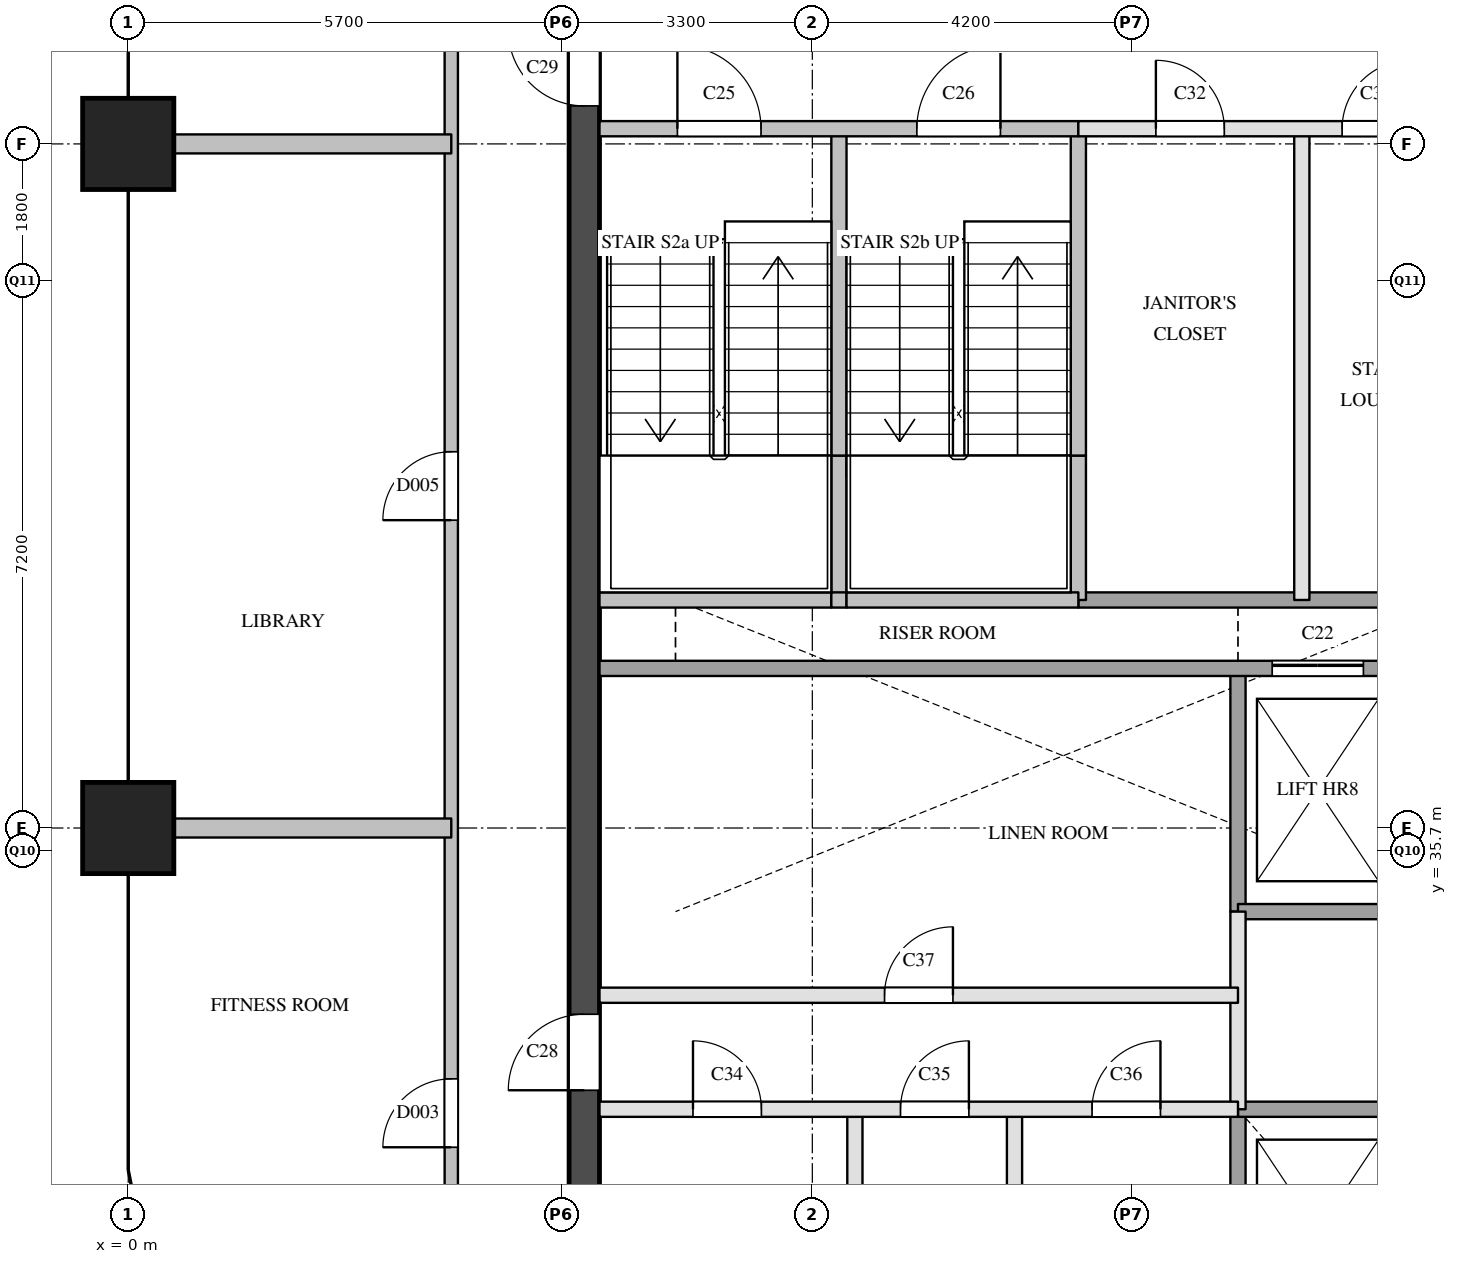
"""IFC4 building model, lengths in metres.
Left out: names, types, materials, properties, quantities, classifications, styles, units other than length and angle.
Written with IfcOpenShell. Run it as: python <this file> out.ifc"""

import sys

from ifc_helpers import new_model, si_unit, direction, frame, frame_2d, origin, origin_2d, place, context, subcontext, project, spatial, rectangle, extrude, element, fill, save


model = new_model("IFC4")
c1 = context("Model", 3, precision=1e-05, world=origin(), true_north=direction((0.0, 1.0)))
c2 = subcontext(c1, "Body", "Model", "MODEL_VIEW")
j1 = project(units=[si_unit("LENGTHUNIT", "METRE"), si_unit("PLANEANGLEUNIT", "RADIAN")], contexts=[c1])
p1 = place(None, origin())
s1 = spatial("IfcSite", under=j1, at=p1, CompositionType="ELEMENT")
p2 = place(p1, origin())
s2 = spatial("IfcBuilding", under=s1, at=p2, CompositionType="ELEMENT")
p3 = place(p2, frame((0.0, 0.0, 226.7)))
s3 = spatial("IfcBuildingStorey", under=s2, at=p3, CompositionType="ELEMENT", Elevation=226.7)
for number, where, z_axis, x_axis in (
    (1, (0.0, 36.0, 0.0), (0.0, 0.0, 1.0), (1.0, 0.0, 0.0)),
    (2, (0.0, 45.0, 0.0), (0.0, 0.0, 1.0), (1.0, 0.0, 0.0)),
):
    element("IfcColumn", number, at=place(p3, frame(where, z_axis=z_axis, x_axis=x_axis)), inside=s3, PredefinedType="COLUMN", context=c2, shape_type="SweptSolid", body=[
        extrude(rectangle(XDim=1.2, YDim=1.2, at=origin_2d()), origin(), (0.0, 0.0, 1.0), 3.9),
    ])
p4 = place(p3, frame((6.0, 29.1, 0.0), z_axis=(0.0, 0.0, 1.0), x_axis=(0.0, 1.0, 0.0)))
e3 = element("IfcWall", 3, at=p4, inside=s3, PredefinedType="SHEAR", context=c2, shape_type="SweptSolid", body=[
    extrude(rectangle(XDim=20.3, YDim=0.4, at=frame_2d((10.15, 0.0))), origin(), (0.0, 0.0, 1.0), 3.5),
])
p5 = place(p4, frame((3.45, 0.0, 0.0)))
e4 = element("IfcOpeningElement", 4, at=p5, cuts=e3, PredefinedType="OPENING", context=c2, shape_type="SweptSolid", body=[
    extrude(rectangle(XDim=1.0, YDim=2.1, at=frame_2d((0.5, 1.05))), frame((0.0, 0.21, 0.0), z_axis=(0.0, -1.0, 0.0), x_axis=(1.0, 0.0, 0.0)), (0.0, 0.0, 1.0), 0.42),
])
p6 = place(p4, frame((16.4, 0.0, 0.0)))
e5 = element("IfcOpeningElement", 5, at=p6, cuts=e3, PredefinedType="OPENING", context=c2, shape_type="SweptSolid", body=[
    extrude(rectangle(XDim=1.0, YDim=2.1, at=frame_2d((0.5, 1.05))), frame((0.0, 0.21, 0.0), z_axis=(0.0, -1.0, 0.0), x_axis=(1.0, 0.0, 0.0)), (0.0, 0.0, 1.0), 0.42),
])
p7 = place(p3, frame((9.35, 39.0, 0.0), z_axis=(0.0, 0.0, 1.0), x_axis=(0.0, 1.0, 0.0)))
e6 = element("IfcWall", 6, at=p7, inside=s3, PredefinedType="SOLIDWALL", context=c2, shape_type="SweptSolid", body=[
    extrude(rectangle(XDim=1.9, YDim=0.2, at=frame_2d((0.95, 0.0))), origin(), (0.0, 0.0, 1.0), 3.5),
])
p8 = place(p3, frame((9.35, 40.9, 0.0), z_axis=(0.0, 0.0, 1.0), x_axis=(0.0, 1.0, 0.0)))
e7 = element("IfcWall", 7, at=p8, inside=s3, PredefinedType="SOLIDWALL", context=c2, shape_type="SweptSolid", body=[
    extrude(rectangle(XDim=4.3, YDim=0.2, at=frame_2d((2.15, 0.0))), origin(), (0.0, 0.0, 1.0), 3.5),
])
for number, where, z_axis, x_axis in (
    (8, (9.56, 29.1, 0.0), (0.0, 0.0, 1.0), (0.0, 1.0, 0.0)),
    (9, (11.66, 29.1, 0.0), (0.0, 0.0, 1.0), (0.0, 1.0, 0.0)),
):
    element("IfcWall", number, at=place(p3, frame(where, z_axis=z_axis, x_axis=x_axis)), inside=s3, PredefinedType="PARTITIONING", context=c2, shape_type="SweptSolid", body=[
        extrude(rectangle(XDim=3.2, YDim=0.2, at=frame_2d((1.6, 0.0))), origin(), (0.0, 0.0, 1.0), 3.5),
    ])
p9 = place(p3, frame((12.5, 39.0, 0.0), z_axis=(0.0, 0.0, 1.0), x_axis=(0.0, 1.0, 0.0)))
e10 = element("IfcWall", 10, at=p9, inside=s3, PredefinedType="SOLIDWALL", context=c2, shape_type="SweptSolid", body=[
    extrude(rectangle(XDim=1.9, YDim=0.2, at=frame_2d((0.95, 0.0))), origin(), (0.0, 0.0, 1.0), 3.5),
])
p10 = place(p3, frame((12.5, 40.9, 0.0), z_axis=(0.0, 0.0, 1.0), x_axis=(0.0, 1.0, 0.0)))
e11 = element("IfcWall", 11, at=p10, inside=s3, PredefinedType="SOLIDWALL", context=c2, shape_type="SweptSolid", body=[
    extrude(rectangle(XDim=4.3, YDim=0.2, at=frame_2d((2.15, 0.0))), origin(), (0.0, 0.0, 1.0), 3.5),
])
p11 = place(p3, frame((14.6, 32.3, 0.0), z_axis=(0.0, 0.0, 1.0), x_axis=(0.0, 1.0, 0.0)))
e12 = element("IfcWall", 12, at=p11, inside=s3, PredefinedType="PARTITIONING", context=c2, shape_type="SweptSolid", body=[
    extrude(rectangle(XDim=2.6, YDim=0.2, at=frame_2d((1.3, 0.0))), origin(), (0.0, 0.0, 1.0), 3.5),
])
p12 = place(p3, frame((14.6, 29.1, 0.0), z_axis=(0.0, 0.0, 1.0), x_axis=(0.0, 1.0, 0.0)))
e13 = element("IfcWall", 13, at=p12, inside=s3, PredefinedType="SOLIDWALL", context=c2, shape_type="SweptSolid", body=[
    extrude(rectangle(XDim=3.2, YDim=0.2, at=frame_2d((1.6, 0.0))), origin(), (0.0, 0.0, 1.0), 3.5),
])
p13 = place(p3, frame((14.6, 34.9, 0.0), z_axis=(0.0, 0.0, 1.0), x_axis=(0.0, 1.0, 0.0)))
e14 = element("IfcWall", 14, at=p13, inside=s3, PredefinedType="SOLIDWALL", context=c2, shape_type="SweptSolid", body=[
    extrude(rectangle(XDim=3.2, YDim=0.2, at=frame_2d((1.6, 0.0))), origin(), (0.0, 0.0, 1.0), 3.5),
])
p14 = place(p3, frame((15.44, 39.0, 0.0), z_axis=(0.0, 0.0, 1.0), x_axis=(0.0, 1.0, 0.0)))
e15 = element("IfcWall", 15, at=p14, inside=s3, PredefinedType="PARTITIONING", context=c2, shape_type="SweptSolid", body=[
    extrude(rectangle(XDim=6.2, YDim=0.2, at=frame_2d((3.1, 0.0))), origin(), (0.0, 0.0, 1.0), 3.5),
])
p15 = place(p3, frame((6.2, 32.3, 0.0), z_axis=(0.0, 0.0, 1.0), x_axis=(1.0, 0.0, 0.0)))
e16 = element("IfcWall", 16, at=p15, inside=s3, PredefinedType="PARTITIONING", context=c2, shape_type="SweptSolid", body=[
    extrude(rectangle(XDim=8.4, YDim=0.2, at=frame_2d((4.2, 0.0))), origin(), (0.0, 0.0, 1.0), 3.5),
])
p16 = place(p15, frame((1.23, 0.0, 0.0)))
e17 = element("IfcOpeningElement", 17, at=p16, cuts=e16, PredefinedType="OPENING", context=c2, shape_type="SweptSolid", body=[
    extrude(rectangle(XDim=0.9, YDim=2.1, at=frame_2d((0.45, 1.05))), frame((0.0, 0.11, 0.0), z_axis=(0.0, -1.0, 0.0), x_axis=(1.0, 0.0, 0.0)), (0.0, 0.0, 1.0), 0.22),
])
p17 = place(p15, frame((3.96, 0.0, 0.0)))
e18 = element("IfcOpeningElement", 18, at=p17, cuts=e16, PredefinedType="OPENING", context=c2, shape_type="SweptSolid", body=[
    extrude(rectangle(XDim=0.9, YDim=2.1, at=frame_2d((0.45, 1.05))), frame((0.0, 0.11, 0.0), z_axis=(0.0, -1.0, 0.0), x_axis=(1.0, 0.0, 0.0)), (0.0, 0.0, 1.0), 0.22),
])
p18 = place(p15, frame((6.48, 0.0, 0.0)))
e19 = element("IfcOpeningElement", 19, at=p18, cuts=e16, PredefinedType="OPENING", context=c2, shape_type="SweptSolid", body=[
    extrude(rectangle(XDim=0.9, YDim=2.1, at=frame_2d((0.45, 1.05))), frame((0.0, 0.11, 0.0), z_axis=(0.0, -1.0, 0.0), x_axis=(1.0, 0.0, 0.0)), (0.0, 0.0, 1.0), 0.22),
])
p19 = place(p3, frame((14.6, 32.3, 0.0), z_axis=(0.0, 0.0, 1.0), x_axis=(1.0, 0.0, 0.0)))
e20 = element("IfcWall", 20, at=p19, inside=s3, PredefinedType="SOLIDWALL", context=c2, shape_type="SweptSolid", body=[
    extrude(rectangle(XDim=2.8, YDim=0.2, at=frame_2d((1.4, 0.0))), origin(), (0.0, 0.0, 1.0), 3.5),
])
p20 = place(p3, frame((6.2, 33.8, 0.0), z_axis=(0.0, 0.0, 1.0), x_axis=(1.0, 0.0, 0.0)))
e21 = element("IfcWall", 21, at=p20, inside=s3, PredefinedType="PARTITIONING", context=c2, shape_type="SweptSolid", body=[
    extrude(rectangle(XDim=8.4, YDim=0.2, at=frame_2d((4.2, 0.0))), origin(), (0.0, 0.0, 1.0), 3.5),
])
p21 = place(p20, frame((3.75, 0.0, 0.0)))
e22 = element("IfcOpeningElement", 22, at=p21, cuts=e21, PredefinedType="OPENING", context=c2, shape_type="SweptSolid", body=[
    extrude(rectangle(XDim=0.9, YDim=2.1, at=frame_2d((0.45, 1.05))), frame((0.0, 0.11, 0.0), z_axis=(0.0, -1.0, 0.0), x_axis=(1.0, 0.0, 0.0)), (0.0, 0.0, 1.0), 0.22),
])
p22 = place(p3, frame((14.6, 34.9, 0.0), z_axis=(0.0, 0.0, 1.0), x_axis=(1.0, 0.0, 0.0)))
e23 = element("IfcWall", 23, at=p22, inside=s3, PredefinedType="SOLIDWALL", context=c2, shape_type="SweptSolid", body=[
    extrude(rectangle(XDim=2.8, YDim=0.2, at=frame_2d((1.4, 0.0))), origin(), (0.0, 0.0, 1.0), 3.5),
])
p23 = place(p3, frame((6.2, 38.1, 0.0), z_axis=(0.0, 0.0, 1.0), x_axis=(1.0, 0.0, 0.0)))
e24 = element("IfcWall", 24, at=p23, inside=s3, PredefinedType="SOLIDWALL", context=c2, shape_type="SweptSolid", body=[
    extrude(rectangle(XDim=11.2, YDim=0.2, at=frame_2d((5.6, 0.0))), origin(), (0.0, 0.0, 1.0), 3.5),
])
p24 = place(p23, frame((8.85, 0.0, 0.0)))
e25 = element("IfcOpeningElement", 25, at=p24, cuts=e24, PredefinedType="OPENING", context=c2, shape_type="SweptSolid", body=[
    extrude(rectangle(XDim=1.2, YDim=2.1, at=frame_2d((0.6, 1.05))), frame((0.0, 0.11, 0.0), z_axis=(0.0, -1.0, 0.0), x_axis=(1.0, 0.0, 0.0)), (0.0, 0.0, 1.0), 0.22),
])
p25 = place(p3, frame((12.5, 39.0, 0.0), z_axis=(0.0, 0.0, 1.0), x_axis=(1.0, 0.0, 0.0)))
e26 = element("IfcWall", 26, at=p25, inside=s3, PredefinedType="SOLIDWALL", context=c2, shape_type="SweptSolid", body=[
    extrude(rectangle(XDim=4.9, YDim=0.2, at=frame_2d((2.45, 0.0))), origin(), (0.0, 0.0, 1.0), 3.5),
])
p26 = place(p3, frame((6.2, 39.0, 0.0), z_axis=(0.0, 0.0, 1.0), x_axis=(1.0, 0.0, 0.0)))
e27 = element("IfcWall", 27, at=p26, inside=s3, PredefinedType="SOLIDWALL", context=c2, shape_type="SweptSolid", body=[
    extrude(rectangle(XDim=3.05, YDim=0.2, at=frame_2d((1.525, 0.0))), origin(), (0.0, 0.0, 1.0), 3.5),
])
p27 = place(p3, frame((9.25, 39.0, 0.0), z_axis=(0.0, 0.0, 1.0), x_axis=(1.0, 0.0, 0.0)))
e28 = element("IfcWall", 28, at=p27, inside=s3, PredefinedType="SOLIDWALL", context=c2, shape_type="SweptSolid", body=[
    extrude(rectangle(XDim=0.2, YDim=0.2, at=frame_2d((0.1, 0.0))), origin(), (0.0, 0.0, 1.0), 3.5),
])
p28 = place(p3, frame((9.45, 39.0, 0.0), z_axis=(0.0, 0.0, 1.0), x_axis=(1.0, 0.0, 0.0)))
e29 = element("IfcWall", 29, at=p28, inside=s3, PredefinedType="SOLIDWALL", context=c2, shape_type="SweptSolid", body=[
    extrude(rectangle(XDim=3.05, YDim=0.2, at=frame_2d((1.525, 0.0))), origin(), (0.0, 0.0, 1.0), 3.5),
])
p29 = place(p3, frame((12.5, 45.2, 0.0), z_axis=(0.0, 0.0, 1.0), x_axis=(1.0, 0.0, 0.0)))
e30 = element("IfcWall", 30, at=p29, inside=s3, PredefinedType="PARTITIONING", context=c2, shape_type="SweptSolid", body=[
    extrude(rectangle(XDim=4.9, YDim=0.2, at=frame_2d((2.45, 0.0))), origin(), (0.0, 0.0, 1.0), 3.5),
])
p30 = place(p29, frame((1.02, 0.0, 0.0)))
e31 = element("IfcOpeningElement", 31, at=p30, cuts=e30, PredefinedType="OPENING", context=c2, shape_type="SweptSolid", body=[
    extrude(rectangle(XDim=0.9, YDim=2.1, at=frame_2d((0.45, 1.05))), frame((0.0, 0.11, 0.0), z_axis=(0.0, -1.0, 0.0), x_axis=(1.0, 0.0, 0.0)), (0.0, 0.0, 1.0), 0.22),
])
p31 = place(p29, frame((3.47, 0.0, 0.0)))
e32 = element("IfcOpeningElement", 32, at=p31, cuts=e30, PredefinedType="OPENING", context=c2, shape_type="SweptSolid", body=[
    extrude(rectangle(XDim=0.9, YDim=2.1, at=frame_2d((0.45, 1.05))), frame((0.0, 0.11, 0.0), z_axis=(0.0, -1.0, 0.0), x_axis=(1.0, 0.0, 0.0)), (0.0, 0.0, 1.0), 0.22),
])
p32 = place(p3, frame((6.2, 45.2, 0.0), z_axis=(0.0, 0.0, 1.0), x_axis=(1.0, 0.0, 0.0)))
e33 = element("IfcWall", 33, at=p32, inside=s3, PredefinedType="SOLIDWALL", context=c2, shape_type="SweptSolid", body=[
    extrude(rectangle(XDim=6.3, YDim=0.2, at=frame_2d((3.15, 0.0))), origin(), (0.0, 0.0, 1.0), 3.5),
])
p33 = place(p32, frame((1.025, 0.0, 0.0)))
e34 = element("IfcOpeningElement", 34, at=p33, cuts=e33, PredefinedType="OPENING", context=c2, shape_type="SweptSolid", body=[
    extrude(rectangle(XDim=1.1, YDim=2.1, at=frame_2d((0.55, 1.05))), frame((0.0, 0.11, 0.0), z_axis=(0.0, -1.0, 0.0), x_axis=(1.0, 0.0, 0.0)), (0.0, 0.0, 1.0), 0.22),
])
p34 = place(p32, frame((4.175, 0.0, 0.0)))
e35 = element("IfcOpeningElement", 35, at=p34, cuts=e33, PredefinedType="OPENING", context=c2, shape_type="SweptSolid", body=[
    extrude(rectangle(XDim=1.1, YDim=2.1, at=frame_2d((0.55, 1.05))), frame((0.0, 0.11, 0.0), z_axis=(0.0, -1.0, 0.0), x_axis=(1.0, 0.0, 0.0)), (0.0, 0.0, 1.0), 0.22),
])
p35 = place(p3, frame((4.25, 28.5, 0.0), z_axis=(0.0, 0.0, 1.0), x_axis=(0.0, 1.0, 0.0)))
e36 = element("IfcWall", 36, at=p35, inside=s3, PredefinedType="PARTITIONING", context=c2, shape_type="SweptSolid", body=[
    extrude(rectangle(XDim=22.85, YDim=0.175, at=frame_2d((11.425, 0.0))), origin(), (0.0, 0.0, 1.0), 3.5),
])
p36 = place(p35, frame((3.3, 0.0, 0.0)))
e37 = element("IfcOpeningElement", 37, at=p36, cuts=e36, PredefinedType="OPENING", context=c2, shape_type="SweptSolid", body=[
    extrude(rectangle(XDim=0.9, YDim=2.1, at=frame_2d((0.45, 1.05))), frame((0.0, 0.097, 0.0), z_axis=(0.0, -1.0, 0.0), x_axis=(1.0, 0.0, 0.0)), (0.0, 0.0, 1.0), 0.195),
])
p37 = place(p35, frame((11.55, 0.0, 0.0)))
e38 = element("IfcOpeningElement", 38, at=p37, cuts=e36, PredefinedType="OPENING", context=c2, shape_type="SweptSolid", body=[
    extrude(rectangle(XDim=0.9, YDim=2.1, at=frame_2d((0.45, 1.05))), frame((0.0, 0.097, 0.0), z_axis=(0.0, -1.0, 0.0), x_axis=(1.0, 0.0, 0.0)), (0.0, 0.0, 1.0), 0.195),
])
p38 = place(p35, frame((19.225, 0.0, 0.0)))
e39 = element("IfcOpeningElement", 39, at=p38, cuts=e36, PredefinedType="OPENING", context=c2, shape_type="SweptSolid", body=[
    extrude(rectangle(XDim=0.9, YDim=2.1, at=frame_2d((0.45, 1.05))), frame((0.0, 0.097, 0.0), z_axis=(0.0, -1.0, 0.0), x_axis=(1.0, 0.0, 0.0)), (0.0, 0.0, 1.0), 0.195),
])
for number, where, z_axis, x_axis in (
    (40, (0.0, 36.0, 0.0), (0.0, 0.0, 1.0), (1.0, 0.0, 0.0)),
    (41, (0.0, 45.0, 0.0), (0.0, 0.0, 1.0), (1.0, 0.0, 0.0)),
):
    element("IfcWall", number, at=place(p3, frame(where, z_axis=z_axis, x_axis=x_axis)), inside=s3, PredefinedType="PARTITIONING", context=c2, shape_type="SweptSolid", body=[
        extrude(rectangle(XDim=4.25, YDim=0.25, at=frame_2d((2.125, 0.0))), origin(), (0.0, 0.0, 1.0), 3.5),
    ])
p39 = place(p24, origin())
e42 = element("IfcDoor", 42, at=p39, inside=s3, OperationType="SLIDING_TO_LEFT", PredefinedType="DOOR", context=c2, shape_type="SweptSolid", body=[
    extrude(rectangle(XDim=1.2, YDim=2.1, at=frame_2d((0.6, 1.05))), frame((0.0, 0.025, 0.0), z_axis=(0.0, -1.0, 0.0), x_axis=(1.0, 0.0, 0.0)), (0.0, 0.0, 1.0), 0.05),
])
fill(e25, e42)
p40 = place(p33, origin())
e43 = element("IfcDoor", 43, at=p40, inside=s3, OperationType="SINGLE_SWING_LEFT", PredefinedType="DOOR", context=c2, shape_type="SweptSolid", body=[
    extrude(rectangle(XDim=1.1, YDim=2.1, at=frame_2d((0.55, 1.05))), frame((0.0, 0.025, 0.0), z_axis=(0.0, -1.0, 0.0), x_axis=(1.0, 0.0, 0.0)), (0.0, 0.0, 1.0), 0.05),
])
fill(e34, e43)
p41 = place(p34, origin())
e44 = element("IfcDoor", 44, at=p41, inside=s3, OperationType="SINGLE_SWING_RIGHT", PredefinedType="DOOR", context=c2, shape_type="SweptSolid", body=[
    extrude(rectangle(XDim=1.1, YDim=2.1, at=frame_2d((0.55, 1.05))), frame((0.0, 0.025, 0.0), z_axis=(0.0, -1.0, 0.0), x_axis=(1.0, 0.0, 0.0)), (0.0, 0.0, 1.0), 0.05),
])
fill(e35, e44)
p42 = place(p5, origin())
e45 = element("IfcDoor", 45, at=p42, inside=s3, OperationType="SINGLE_SWING_LEFT", PredefinedType="DOOR", context=c2, shape_type="SweptSolid", body=[
    extrude(rectangle(XDim=1.0, YDim=2.1, at=frame_2d((0.5, 1.05))), frame((0.0, 0.025, 0.0), z_axis=(0.0, -1.0, 0.0), x_axis=(1.0, 0.0, 0.0)), (0.0, 0.0, 1.0), 0.05),
])
fill(e4, e45)
p43 = place(p6, origin())
e46 = element("IfcDoor", 46, at=p43, inside=s3, OperationType="SINGLE_SWING_RIGHT", PredefinedType="DOOR", context=c2, shape_type="SweptSolid", body=[
    extrude(rectangle(XDim=1.0, YDim=2.1, at=frame_2d((0.5, 1.05))), frame((0.0, 0.025, 0.0), z_axis=(0.0, -1.0, 0.0), x_axis=(1.0, 0.0, 0.0)), (0.0, 0.0, 1.0), 0.05),
])
fill(e5, e46)
p44 = place(p30, origin())
e47 = element("IfcDoor", 47, at=p44, inside=s3, OperationType="SINGLE_SWING_LEFT", PredefinedType="DOOR", context=c2, shape_type="SweptSolid", body=[
    extrude(rectangle(XDim=0.9, YDim=2.1, at=frame_2d((0.45, 1.05))), frame((0.0, 0.025, 0.0), z_axis=(0.0, -1.0, 0.0), x_axis=(1.0, 0.0, 0.0)), (0.0, 0.0, 1.0), 0.05),
])
fill(e31, e47)
p45 = place(p31, origin())
e48 = element("IfcDoor", 48, at=p45, inside=s3, OperationType="SINGLE_SWING_RIGHT", PredefinedType="DOOR", context=c2, shape_type="SweptSolid", body=[
    extrude(rectangle(XDim=0.9, YDim=2.1, at=frame_2d((0.45, 1.05))), frame((0.0, 0.025, 0.0), z_axis=(0.0, -1.0, 0.0), x_axis=(1.0, 0.0, 0.0)), (0.0, 0.0, 1.0), 0.05),
])
fill(e32, e48)
p46 = place(p16, origin())
e49 = element("IfcDoor", 49, at=p46, inside=s3, OperationType="SINGLE_SWING_LEFT", PredefinedType="DOOR", context=c2, shape_type="SweptSolid", body=[
    extrude(rectangle(XDim=0.9, YDim=2.1, at=frame_2d((0.45, 1.05))), frame((0.0, 0.025, 0.0), z_axis=(0.0, -1.0, 0.0), x_axis=(1.0, 0.0, 0.0)), (0.0, 0.0, 1.0), 0.05),
])
fill(e17, e49)
p47 = place(p17, origin())
e50 = element("IfcDoor", 50, at=p47, inside=s3, OperationType="SINGLE_SWING_RIGHT", PredefinedType="DOOR", context=c2, shape_type="SweptSolid", body=[
    extrude(rectangle(XDim=0.9, YDim=2.1, at=frame_2d((0.45, 1.05))), frame((0.0, 0.025, 0.0), z_axis=(0.0, -1.0, 0.0), x_axis=(1.0, 0.0, 0.0)), (0.0, 0.0, 1.0), 0.05),
])
fill(e18, e50)
p48 = place(p18, origin())
e51 = element("IfcDoor", 51, at=p48, inside=s3, OperationType="SINGLE_SWING_RIGHT", PredefinedType="DOOR", context=c2, shape_type="SweptSolid", body=[
    extrude(rectangle(XDim=0.9, YDim=2.1, at=frame_2d((0.45, 1.05))), frame((0.0, 0.025, 0.0), z_axis=(0.0, -1.0, 0.0), x_axis=(1.0, 0.0, 0.0)), (0.0, 0.0, 1.0), 0.05),
])
fill(e19, e51)
p49 = place(p21, origin())
e52 = element("IfcDoor", 52, at=p49, inside=s3, OperationType="SINGLE_SWING_RIGHT", PredefinedType="DOOR", context=c2, shape_type="SweptSolid", body=[
    extrude(rectangle(XDim=0.9, YDim=2.1, at=frame_2d((0.45, 1.05))), frame((0.0, 0.025, 0.0), z_axis=(0.0, -1.0, 0.0), x_axis=(1.0, 0.0, 0.0)), (0.0, 0.0, 1.0), 0.05),
])
fill(e22, e52)
p50 = place(p36, origin())
e53 = element("IfcDoor", 53, at=p50, inside=s3, OperationType="SINGLE_SWING_LEFT", PredefinedType="DOOR", context=c2, shape_type="SweptSolid", body=[
    extrude(rectangle(XDim=0.9, YDim=2.1, at=frame_2d((0.45, 1.05))), frame((0.0, 0.025, 0.0), z_axis=(0.0, -1.0, 0.0), x_axis=(1.0, 0.0, 0.0)), (0.0, 0.0, 1.0), 0.05),
])
fill(e37, e53)
p51 = place(p37, origin())
e54 = element("IfcDoor", 54, at=p51, inside=s3, OperationType="SINGLE_SWING_LEFT", PredefinedType="DOOR", context=c2, shape_type="SweptSolid", body=[
    extrude(rectangle(XDim=0.9, YDim=2.1, at=frame_2d((0.45, 1.05))), frame((0.0, 0.025, 0.0), z_axis=(0.0, -1.0, 0.0), x_axis=(1.0, 0.0, 0.0)), (0.0, 0.0, 1.0), 0.05),
])
fill(e38, e54)
save(model, sys.argv[1])
